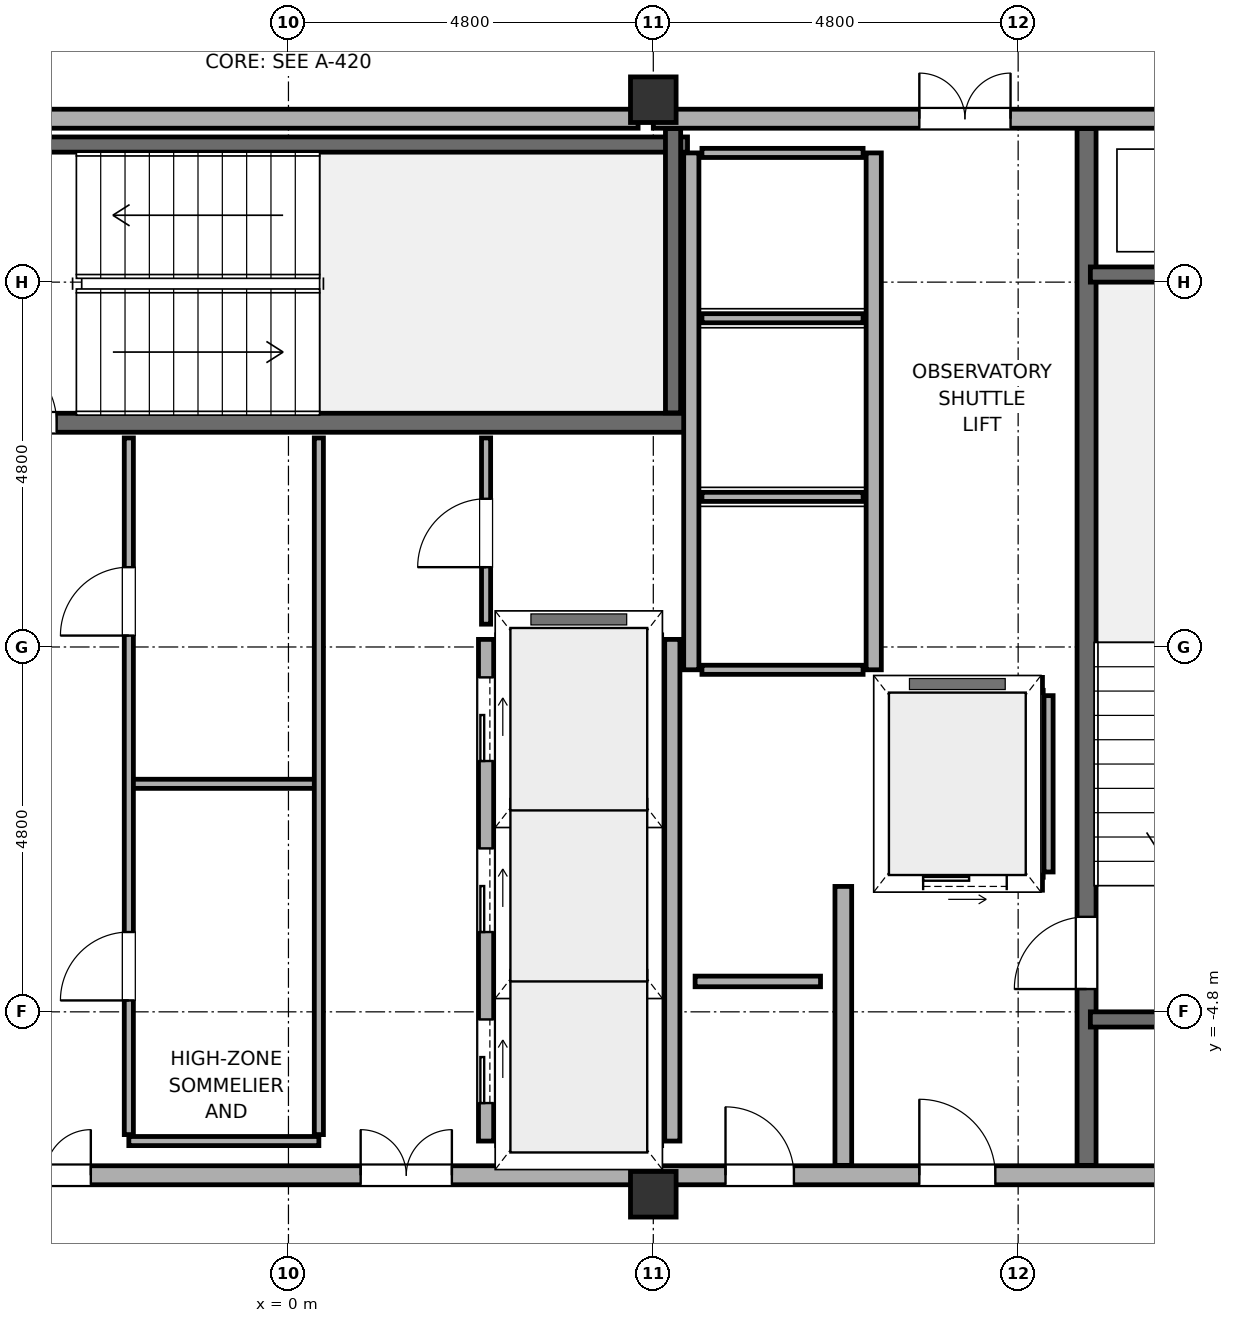
"""IFC4 building model, lengths in metres.
Left out: names, types, materials, properties, quantities, classifications, styles, units other than length and angle.
Written with IfcOpenShell. Run it as: python <this file> out.ifc"""

import sys

from ifc_helpers import new_model, si_unit, direction, frame, frame_2d, origin, origin_2d, place, context, subcontext, project, spatial, rectangle, hollow_rectangle, extrude, element, fill, save


model = new_model("IFC4")
c1 = context("Model", 3, precision=1e-05, world=origin(), true_north=direction((0.0, 1.0)))
c2 = subcontext(c1, "Body", "Model", "MODEL_VIEW")
j1 = project(units=[si_unit("LENGTHUNIT", "METRE"), si_unit("PLANEANGLEUNIT", "RADIAN")], contexts=[c1])
p1 = place(None, origin())
s1 = spatial("IfcSite", under=j1, at=p1, CompositionType="ELEMENT")
p2 = place(p1, origin())
s2 = spatial("IfcBuilding", under=s1, at=p2, CompositionType="ELEMENT")
p3 = place(p2, frame((0.0, 0.0, 222.3)))
s3 = spatial("IfcBuildingStorey", under=s2, at=p3, CompositionType="ELEMENT", Elevation=222.3)
for number, where, z_axis, x_axis in (
    (1, (4.8, -7.2, 0.0), (0.0, 0.0, 1.0), (1.0, 0.0, 0.0)),
    (2, (4.8, 7.2, 0.0), (0.0, 0.0, 1.0), (1.0, 0.0, 0.0)),
):
    element("IfcColumn", number, at=place(p3, frame(where, z_axis=z_axis, x_axis=x_axis)), inside=s3, PredefinedType="COLUMN", context=c2, shape_type="SweptSolid", body=[
        extrude(hollow_rectangle(XDim=0.6, YDim=0.6, WallThickness=0.028, at=origin_2d()), origin(), (0.0, 0.0, 1.0), 3.85),
    ])
p4 = place(p3, frame((-4.6, -6.95, 0.0), z_axis=(0.0, 0.0, 1.0), x_axis=(1.0, 0.0, 0.0)))
e3 = element("IfcWall", 3, at=p4, inside=s3, PredefinedType="SOLIDWALL", context=c2, shape_type="SweptSolid", body=[
    extrude(rectangle(XDim=9.2, YDim=0.25, at=frame_2d((4.6, 0.0))), origin(), (0.0, 0.0, 1.0), 2.47),
])
p5 = place(p4, frame((0.8, 0.0, 0.0)))
e4 = element("IfcOpeningElement", 4, at=p5, cuts=e3, PredefinedType="OPENING", context=c2, shape_type="SweptSolid", body=[
    extrude(rectangle(XDim=1.2, YDim=2.2, at=frame_2d((0.6, 1.1))), frame((0.0, 0.14, 0.0), z_axis=(0.0, -1.0, 0.0), x_axis=(1.0, 0.0, 0.0)), (0.0, 0.0, 1.0), 0.28),
])
p6 = place(p4, frame((5.55, 0.0, 0.0)))
e5 = element("IfcOpeningElement", 5, at=p6, cuts=e3, PredefinedType="OPENING", context=c2, shape_type="SweptSolid", body=[
    extrude(rectangle(XDim=1.2, YDim=2.2, at=frame_2d((0.6, 1.1))), frame((0.0, 0.14, 0.0), z_axis=(0.0, -1.0, 0.0), x_axis=(1.0, 0.0, 0.0)), (0.0, 0.0, 1.0), 0.28),
])
p7 = place(p3, frame((4.8, -6.95, 0.0), z_axis=(0.0, 0.0, 1.0), x_axis=(1.0, 0.0, 0.0)))
e6 = element("IfcWall", 6, at=p7, inside=s3, PredefinedType="SOLIDWALL", context=c2, shape_type="SweptSolid", body=[
    extrude(rectangle(XDim=9.4, YDim=0.25, at=frame_2d((4.7, 0.0))), origin(), (0.0, 0.0, 1.0), 2.27),
])
p8 = place(p7, frame((3.5, 0.0, 0.0)))
e7 = element("IfcOpeningElement", 7, at=p8, cuts=e6, PredefinedType="OPENING", context=c2, shape_type="SweptSolid", body=[
    extrude(rectangle(XDim=1.0, YDim=2.15, at=frame_2d((0.5, 1.075))), frame((0.0, 0.14, 0.0), z_axis=(0.0, -1.0, 0.0), x_axis=(1.0, 0.0, 0.0)), (0.0, 0.0, 1.0), 0.28),
])
p9 = place(p7, frame((0.95, 0.0, 0.0)))
e8 = element("IfcOpeningElement", 8, at=p9, cuts=e6, PredefinedType="OPENING", context=c2, shape_type="SweptSolid", body=[
    extrude(rectangle(XDim=0.9, YDim=2.1, at=frame_2d((0.45, 1.05))), frame((0.0, 0.14, 0.0), z_axis=(0.0, -1.0, 0.0), x_axis=(1.0, 0.0, 0.0)), (0.0, 0.0, 1.0), 0.28),
])
p10 = place(p3, frame((-4.6, 6.95, 0.0), z_axis=(0.0, 0.0, 1.0), x_axis=(1.0, 0.0, 0.0)))
e9 = element("IfcWall", 9, at=p10, inside=s3, PredefinedType="SOLIDWALL", context=c2, shape_type="SweptSolid", body=[
    extrude(rectangle(XDim=9.2, YDim=0.25, at=frame_2d((4.6, 0.0))), origin(), (0.0, 0.0, 1.0), 2.27),
])
p11 = place(p3, frame((4.8, 6.95, 0.0), z_axis=(0.0, 0.0, 1.0), x_axis=(1.0, 0.0, 0.0)))
e10 = element("IfcWall", 10, at=p11, inside=s3, PredefinedType="SOLIDWALL", context=c2, shape_type="SweptSolid", body=[
    extrude(rectangle(XDim=9.4, YDim=0.25, at=frame_2d((4.7, 0.0))), origin(), (0.0, 0.0, 1.0), 2.27),
])
p12 = place(p11, frame((3.5, 0.0, 0.0)))
e11 = element("IfcOpeningElement", 11, at=p12, cuts=e10, PredefinedType="OPENING", context=c2, shape_type="SweptSolid", body=[
    extrude(rectangle(XDim=1.2, YDim=2.2, at=frame_2d((0.6, 1.1))), frame((0.0, 0.14, 0.0), z_axis=(0.0, -1.0, 0.0), x_axis=(1.0, 0.0, 0.0)), (0.0, 0.0, 1.0), 0.28),
])
p13 = place(p3, frame((7.3, -6.82, 0.0), z_axis=(0.0, 0.0, 1.0), x_axis=(0.0, 1.0, 0.0)))
e12 = element("IfcWall", 12, at=p13, inside=s3, PredefinedType="SOLIDWALL", context=c2, shape_type="SweptSolid", body=[
    extrude(rectangle(XDim=3.67, YDim=0.22, at=frame_2d((1.835, 0.0))), origin(), (0.0, 0.0, 1.0), 2.27),
])
p14 = place(p3, frame((10.5, -6.82, -0.18), z_axis=(0.0, 0.0, 1.0), x_axis=(0.0, 1.0, 0.0)))
e13 = element("IfcWall", 13, at=p14, inside=s3, PredefinedType="SOLIDWALL", context=c2, shape_type="SweptSolid", body=[
    extrude(rectangle(XDim=13.64, YDim=0.25, at=frame_2d((6.82, 0.0))), origin(), (0.0, 0.0, 1.0), 3.85),
])
p15 = place(p14, frame((2.32, 0.0, 0.18)))
e14 = element("IfcOpeningElement", 14, at=p15, cuts=e13, PredefinedType="OPENING", context=c2, shape_type="SweptSolid", body=[
    extrude(rectangle(XDim=0.95, YDim=2.15, at=frame_2d((0.475, 1.075))), frame((0.0, 0.14, 0.0), z_axis=(0.0, -1.0, 0.0), x_axis=(1.0, 0.0, 0.0)), (0.0, 0.0, 1.0), 0.28),
])
for number, where, z_axis, x_axis in (
    (15, (10.55, -4.9, -0.18), (0.0, 0.0, 1.0), (1.0, 0.0, 0.0)),
    (16, (10.55, 4.9, -0.18), (0.0, 0.0, 1.0), (1.0, 0.0, 0.0)),
):
    element("IfcWall", number, at=place(p3, frame(where, z_axis=z_axis, x_axis=x_axis)), inside=s3, PredefinedType="SOLIDWALL", context=c2, shape_type="SweptSolid", body=[
        extrude(rectangle(XDim=3.65, YDim=0.2, at=frame_2d((1.825, 0.0))), origin(), (0.0, 0.0, 1.0), 3.85),
    ])
p16 = place(p3, frame((-4.65, 2.95, -0.18), z_axis=(0.0, 0.0, 1.0), x_axis=(1.0, 0.0, 0.0)))
e17 = element("IfcWall", 17, at=p16, inside=s3, PredefinedType="SOLIDWALL", context=c2, shape_type="SweptSolid", body=[
    extrude(rectangle(XDim=9.9, YDim=0.25, at=frame_2d((4.95, 0.0))), origin(), (0.0, 0.0, 1.0), 3.85),
])
p17 = place(p16, frame((0.65, 0.0, 0.18)))
e18 = element("IfcOpeningElement", 18, at=p17, cuts=e17, PredefinedType="OPENING", context=c2, shape_type="SweptSolid", body=[
    extrude(rectangle(XDim=0.95, YDim=2.15, at=frame_2d((0.475, 1.075))), frame((0.0, 0.14, 0.0), z_axis=(0.0, -1.0, 0.0), x_axis=(1.0, 0.0, 0.0)), (0.0, 0.0, 1.0), 0.28),
])
p18 = place(p3, frame((-4.65, 6.61, -0.18), z_axis=(0.0, 0.0, 1.0), x_axis=(1.0, 0.0, 0.0)))
e19 = element("IfcWall", 19, at=p18, inside=s3, PredefinedType="SOLIDWALL", context=c2, shape_type="SweptSolid", body=[
    extrude(rectangle(XDim=9.9, YDim=0.2, at=frame_2d((4.95, 0.0))), origin(), (0.0, 0.0, 1.0), 3.85),
])
p19 = place(p3, frame((5.06, 3.08, -0.18), z_axis=(0.0, 0.0, 1.0), x_axis=(0.0, 1.0, 0.0)))
e20 = element("IfcWall", 20, at=p19, inside=s3, PredefinedType="SOLIDWALL", context=c2, shape_type="SweptSolid", body=[
    extrude(rectangle(XDim=3.74, YDim=0.2, at=frame_2d((1.87, 0.0))), origin(), (0.0, 0.0, 1.0), 3.85),
])
p20 = place(p3, frame((2.6, -6.5, 0.0), z_axis=(0.0, 0.0, 1.0), x_axis=(0.0, 1.0, 0.0)))
e21 = element("IfcWall", 21, at=p20, inside=s3, PredefinedType="SOLIDWALL", context=c2, shape_type="SweptSolid", body=[
    extrude(rectangle(XDim=6.6, YDim=0.2, at=frame_2d((3.3, 0.0))), origin(), (0.0, 0.0, 1.0), 3.67),
])
p21 = place(p20, frame((0.5, 0.0, 0.0)))
e22 = element("IfcOpeningElement", 22, at=p21, cuts=e21, PredefinedType="OPENING", context=c2, shape_type="SweptSolid", body=[
    extrude(rectangle(XDim=1.1, YDim=2.2, at=frame_2d((0.55, 1.1))), frame((0.0, 0.115, 0.0), z_axis=(0.0, -1.0, 0.0), x_axis=(1.0, 0.0, 0.0)), (0.0, 0.0, 1.0), 0.23),
])
p22 = place(p20, frame((2.75, 0.0, 0.0)))
e23 = element("IfcOpeningElement", 23, at=p22, cuts=e21, PredefinedType="OPENING", context=c2, shape_type="SweptSolid", body=[
    extrude(rectangle(XDim=1.1, YDim=2.2, at=frame_2d((0.55, 1.1))), frame((0.0, 0.115, 0.0), z_axis=(0.0, -1.0, 0.0), x_axis=(1.0, 0.0, 0.0)), (0.0, 0.0, 1.0), 0.23),
])
p23 = place(p20, frame((5.0, 0.0, 0.0)))
e24 = element("IfcOpeningElement", 24, at=p23, cuts=e21, PredefinedType="OPENING", context=c2, shape_type="SweptSolid", body=[
    extrude(rectangle(XDim=1.1, YDim=2.2, at=frame_2d((0.55, 1.1))), frame((0.0, 0.115, 0.0), z_axis=(0.0, -1.0, 0.0), x_axis=(1.0, 0.0, 0.0)), (0.0, 0.0, 1.0), 0.23),
])
p24 = place(p3, frame((5.05, -6.5, 0.0), z_axis=(0.0, 0.0, 1.0), x_axis=(0.0, 1.0, 0.0)))
e25 = element("IfcWall", 25, at=p24, inside=s3, PredefinedType="SOLIDWALL", context=c2, shape_type="SweptSolid", body=[
    extrude(rectangle(XDim=6.6, YDim=0.2, at=frame_2d((3.3, 0.0))), origin(), (0.0, 0.0, 1.0), 3.67),
])
for number, where, z_axis, x_axis in (
    (26, (2.74, -6.5, 0.0), (0.0, 0.0, 1.0), (1.0, 0.0, 0.0)),
    (27, (2.74, -4.325, 0.0), (0.0, 0.0, 1.0), (1.0, 0.0, 0.0)),
    (28, (2.74, -2.075, 0.0), (0.0, 0.0, 1.0), (1.0, 0.0, 0.0)),
    (29, (2.74, 0.1, 0.0), (0.0, 0.0, 1.0), (1.0, 0.0, 0.0)),
):
    element("IfcWall", number, at=place(p3, frame(where, z_axis=z_axis, x_axis=x_axis)), inside=s3, PredefinedType="PARTITIONING", context=c2, shape_type="SweptSolid", body=[
        extrude(rectangle(XDim=2.17, YDim=0.12, at=frame_2d((1.085, 0.0))), origin(), (0.0, 0.0, 1.0), 3.67),
    ])
for number, where, z_axis, x_axis in (
    (30, (7.7, -0.3, 0.0), (0.0, 0.0, 1.0), (0.0, 1.0, 0.0)),
    (31, (5.3, -0.3, 0.0), (0.0, 0.0, 1.0), (0.0, 1.0, 0.0)),
):
    element("IfcWall", number, at=place(p3, frame(where, z_axis=z_axis, x_axis=x_axis)), inside=s3, PredefinedType="SOLIDWALL", context=c2, shape_type="SweptSolid", body=[
        extrude(rectangle(XDim=6.8, YDim=0.2, at=frame_2d((3.4, 0.0))), origin(), (0.0, 0.0, 1.0), 3.67),
    ])
for number, where, z_axis, x_axis in (
    (32, (5.44, -0.3, 0.0), (0.0, 0.0, 1.0), (1.0, 0.0, 0.0)),
    (33, (5.44, 1.975, 0.0), (0.0, 0.0, 1.0), (1.0, 0.0, 0.0)),
    (34, (5.44, 4.325, 0.0), (0.0, 0.0, 1.0), (1.0, 0.0, 0.0)),
    (35, (5.44, 6.5, 0.0), (0.0, 0.0, 1.0), (1.0, 0.0, 0.0)),
):
    element("IfcWall", number, at=place(p3, frame(where, z_axis=z_axis, x_axis=x_axis)), inside=s3, PredefinedType="PARTITIONING", context=c2, shape_type="SweptSolid", body=[
        extrude(rectangle(XDim=2.12, YDim=0.12, at=frame_2d((1.06, 0.0))), origin(), (0.0, 0.0, 1.0), 3.67),
    ])
p25 = place(p3, frame((7.88, -3.1, 0.0), z_axis=(0.0, 0.0, 1.0), x_axis=(1.0, 0.0, 0.0)))
e36 = element("IfcWall", 36, at=p25, inside=s3, PredefinedType="SOLIDWALL", context=c2, shape_type="SweptSolid", body=[
    extrude(rectangle(XDim=2.04, YDim=0.2, at=frame_2d((1.02, 0.0))), origin(), (0.0, 0.0, 1.0), 3.67),
])
p26 = place(p25, frame((0.47, 0.0, 0.0)))
e37 = element("IfcOpeningElement", 37, at=p26, cuts=e36, PredefinedType="OPENING", context=c2, shape_type="SweptSolid", body=[
    extrude(rectangle(XDim=1.1, YDim=2.2, at=frame_2d((0.55, 1.1))), frame((0.0, 0.115, 0.0), z_axis=(0.0, -1.0, 0.0), x_axis=(1.0, 0.0, 0.0)), (0.0, 0.0, 1.0), 0.23),
])
p27 = place(p3, frame((7.88, -0.5, 0.0), z_axis=(0.0, 0.0, 1.0), x_axis=(1.0, 0.0, 0.0)))
e38 = element("IfcWall", 38, at=p27, inside=s3, PredefinedType="SOLIDWALL", context=c2, shape_type="SweptSolid", body=[
    extrude(rectangle(XDim=2.04, YDim=0.2, at=frame_2d((1.02, 0.0))), origin(), (0.0, 0.0, 1.0), 3.67),
])
for number, where, z_axis, x_axis in (
    (39, (7.8, -2.96, 0.0), (0.0, 0.0, 1.0), (0.0, 1.0, 0.0)),
    (40, (10.0, -2.96, 0.0), (0.0, 0.0, 1.0), (0.0, 1.0, 0.0)),
):
    element("IfcWall", number, at=place(p3, frame(where, z_axis=z_axis, x_axis=x_axis)), inside=s3, PredefinedType="PARTITIONING", context=c2, shape_type="SweptSolid", body=[
        extrude(rectangle(XDim=2.32, YDim=0.12, at=frame_2d((1.16, 0.0))), origin(), (0.0, 0.0, 1.0), 3.67),
    ])
p28 = place(p3, frame((-2.1, -6.5, 0.0), z_axis=(0.0, 0.0, 1.0), x_axis=(1.0, 0.0, 0.0)))
e41 = element("IfcWall", 41, at=p28, inside=s3, PredefinedType="PARTITIONING", context=c2, shape_type="SweptSolid", body=[
    extrude(rectangle(XDim=2.5, YDim=0.12, at=frame_2d((1.25, 0.0))), origin(), (0.0, 0.0, 1.0), 3.67),
])
p29 = place(p3, frame((5.35, -4.4, 0.0), z_axis=(0.0, 0.0, 1.0), x_axis=(1.0, 0.0, 0.0)))
e42 = element("IfcWall", 42, at=p29, inside=s3, PredefinedType="PLUMBINGWALL", context=c2, shape_type="SweptSolid", body=[
    extrude(rectangle(XDim=1.65, YDim=0.14, at=frame_2d((0.825, 0.0))), origin(), (0.0, 0.0, 1.0), 3.67),
])
p30 = place(p3, frame((-2.1, -1.8, 0.0), z_axis=(0.0, 0.0, 1.0), x_axis=(1.0, 0.0, 0.0)))
e43 = element("IfcWall", 43, at=p30, inside=s3, PredefinedType="PARTITIONING", context=c2, shape_type="SweptSolid", body=[
    extrude(rectangle(XDim=2.5, YDim=0.12, at=frame_2d((1.25, 0.0))), origin(), (0.0, 0.0, 1.0), 3.67),
])
p31 = place(p3, frame((-2.1, -6.415, 0.0), z_axis=(0.0, 0.0, 1.0), x_axis=(0.0, 1.0, 0.0)))
e44 = element("IfcWall", 44, at=p31, inside=s3, PredefinedType="PARTITIONING", context=c2, shape_type="SweptSolid", body=[
    extrude(rectangle(XDim=9.165, YDim=0.12, at=frame_2d((4.583, 0.0))), origin(), (0.0, 0.0, 1.0), 3.67),
])
p32 = place(p31, frame((1.765, 0.0, 0.0)))
e45 = element("IfcOpeningElement", 45, at=p32, cuts=e44, PredefinedType="OPENING", context=c2, shape_type="SweptSolid", body=[
    extrude(rectangle(XDim=0.9, YDim=2.1, at=frame_2d((0.45, 1.05))), frame((0.0, 0.075, 0.0), z_axis=(0.0, -1.0, 0.0), x_axis=(1.0, 0.0, 0.0)), (0.0, 0.0, 1.0), 0.15),
])
p33 = place(p31, frame((6.565, 0.0, 0.0)))
e46 = element("IfcOpeningElement", 46, at=p33, cuts=e44, PredefinedType="OPENING", context=c2, shape_type="SweptSolid", body=[
    extrude(rectangle(XDim=0.9, YDim=2.1, at=frame_2d((0.45, 1.05))), frame((0.0, 0.075, 0.0), z_axis=(0.0, -1.0, 0.0), x_axis=(1.0, 0.0, 0.0)), (0.0, 0.0, 1.0), 0.15),
])
p34 = place(p3, frame((0.4, -6.415, 0.0), z_axis=(0.0, 0.0, 1.0), x_axis=(0.0, 1.0, 0.0)))
e47 = element("IfcWall", 47, at=p34, inside=s3, PredefinedType="PARTITIONING", context=c2, shape_type="SweptSolid", body=[
    extrude(rectangle(XDim=9.165, YDim=0.12, at=frame_2d((4.583, 0.0))), origin(), (0.0, 0.0, 1.0), 3.67),
])
p35 = place(p3, frame((2.6, 0.3, 0.0), z_axis=(0.0, 0.0, 1.0), x_axis=(0.0, 1.0, 0.0)))
e48 = element("IfcWall", 48, at=p35, inside=s3, PredefinedType="PARTITIONING", context=c2, shape_type="SweptSolid", body=[
    extrude(rectangle(XDim=2.45, YDim=0.12, at=frame_2d((1.225, 0.0))), origin(), (0.0, 0.0, 1.0), 3.67),
])
p36 = place(p35, frame((0.75, 0.0, 0.0)))
e49 = element("IfcOpeningElement", 49, at=p36, cuts=e48, PredefinedType="OPENING", context=c2, shape_type="SweptSolid", body=[
    extrude(rectangle(XDim=0.9, YDim=2.1, at=frame_2d((0.45, 1.05))), frame((0.0, 0.075, 0.0), z_axis=(0.0, -1.0, 0.0), x_axis=(1.0, 0.0, 0.0)), (0.0, 0.0, 1.0), 0.15),
])
p37 = place(p8, origin())
e50 = element("IfcDoor", 50, at=p37, inside=s3, OperationType="SINGLE_SWING_RIGHT", PredefinedType="DOOR", context=c2, shape_type="SweptSolid", body=[
    extrude(rectangle(XDim=1.0, YDim=2.15, at=frame_2d((0.5, 1.075))), frame((0.0, 0.025, 0.0), z_axis=(0.0, -1.0, 0.0), x_axis=(1.0, 0.0, 0.0)), (0.0, 0.0, 1.0), 0.05),
])
fill(e7, e50)
p38 = place(p5, origin())
e51 = element("IfcDoor", 51, at=p38, inside=s3, OperationType="DOUBLE_DOOR_SINGLE_SWING", PredefinedType="DOOR", context=c2, shape_type="SweptSolid", body=[
    extrude(rectangle(XDim=1.2, YDim=2.2, at=frame_2d((0.6, 1.1))), frame((0.0, 0.025, 0.0), z_axis=(0.0, -1.0, 0.0), x_axis=(1.0, 0.0, 0.0)), (0.0, 0.0, 1.0), 0.05),
])
fill(e4, e51)
p39 = place(p6, origin())
e52 = element("IfcDoor", 52, at=p39, inside=s3, OperationType="DOUBLE_DOOR_SINGLE_SWING", PredefinedType="DOOR", context=c2, shape_type="SweptSolid", body=[
    extrude(rectangle(XDim=1.2, YDim=2.2, at=frame_2d((0.6, 1.1))), frame((0.0, 0.025, 0.0), z_axis=(0.0, -1.0, 0.0), x_axis=(1.0, 0.0, 0.0)), (0.0, 0.0, 1.0), 0.05),
])
fill(e5, e52)
p40 = place(p12, origin())
e53 = element("IfcDoor", 53, at=p40, inside=s3, OperationType="DOUBLE_DOOR_SINGLE_SWING", PredefinedType="DOOR", context=c2, shape_type="SweptSolid", body=[
    extrude(rectangle(XDim=1.2, YDim=2.2, at=frame_2d((0.6, 1.1))), frame((0.0, 0.025, 0.0), z_axis=(0.0, -1.0, 0.0), x_axis=(1.0, 0.0, 0.0)), (0.0, 0.0, 1.0), 0.05),
])
fill(e11, e53)
p41 = place(p15, origin())
e54 = element("IfcDoor", 54, at=p41, inside=s3, OperationType="SINGLE_SWING_LEFT", PredefinedType="DOOR", context=c2, shape_type="SweptSolid", body=[
    extrude(rectangle(XDim=0.95, YDim=2.15, at=frame_2d((0.475, 1.075))), frame((0.0, 0.025, 0.0), z_axis=(0.0, -1.0, 0.0), x_axis=(1.0, 0.0, 0.0)), (0.0, 0.0, 1.0), 0.05),
])
fill(e14, e54)
p42 = place(p17, origin())
e55 = element("IfcDoor", 55, at=p42, inside=s3, OperationType="SINGLE_SWING_LEFT", PredefinedType="DOOR", context=c2, shape_type="SweptSolid", body=[
    extrude(rectangle(XDim=0.95, YDim=2.15, at=frame_2d((0.475, 1.075))), frame((0.0, 0.025, 0.0), z_axis=(0.0, -1.0, 0.0), x_axis=(1.0, 0.0, 0.0)), (0.0, 0.0, 1.0), 0.05),
])
fill(e18, e55)
p43 = place(p21, origin())
e56 = element("IfcDoor", 56, at=p43, inside=s3, OperationType="SLIDING_TO_LEFT", PredefinedType="DOOR", context=c2, shape_type="SweptSolid", body=[
    extrude(rectangle(XDim=1.1, YDim=2.2, at=frame_2d((0.55, 1.1))), frame((0.0, 0.025, 0.0), z_axis=(0.0, -1.0, 0.0), x_axis=(1.0, 0.0, 0.0)), (0.0, 0.0, 1.0), 0.05),
])
fill(e22, e56)
p44 = place(p22, origin())
e57 = element("IfcDoor", 57, at=p44, inside=s3, OperationType="SLIDING_TO_LEFT", PredefinedType="DOOR", context=c2, shape_type="SweptSolid", body=[
    extrude(rectangle(XDim=1.1, YDim=2.2, at=frame_2d((0.55, 1.1))), frame((0.0, 0.025, 0.0), z_axis=(0.0, -1.0, 0.0), x_axis=(1.0, 0.0, 0.0)), (0.0, 0.0, 1.0), 0.05),
])
fill(e23, e57)
p45 = place(p23, origin())
e58 = element("IfcDoor", 58, at=p45, inside=s3, OperationType="SLIDING_TO_LEFT", PredefinedType="DOOR", context=c2, shape_type="SweptSolid", body=[
    extrude(rectangle(XDim=1.1, YDim=2.2, at=frame_2d((0.55, 1.1))), frame((0.0, 0.025, 0.0), z_axis=(0.0, -1.0, 0.0), x_axis=(1.0, 0.0, 0.0)), (0.0, 0.0, 1.0), 0.05),
])
fill(e24, e58)
p46 = place(p26, origin())
e59 = element("IfcDoor", 59, at=p46, inside=s3, OperationType="SLIDING_TO_LEFT", PredefinedType="DOOR", context=c2, shape_type="SweptSolid", body=[
    extrude(rectangle(XDim=1.1, YDim=2.2, at=frame_2d((0.55, 1.1))), frame((0.0, 0.025, 0.0), z_axis=(0.0, -1.0, 0.0), x_axis=(1.0, 0.0, 0.0)), (0.0, 0.0, 1.0), 0.05),
])
fill(e37, e59)
p47 = place(p32, origin())
e60 = element("IfcDoor", 60, at=p47, inside=s3, OperationType="SINGLE_SWING_RIGHT", PredefinedType="DOOR", context=c2, shape_type="SweptSolid", body=[
    extrude(rectangle(XDim=0.9, YDim=2.1, at=frame_2d((0.45, 1.05))), frame((0.0, 0.025, 0.0), z_axis=(0.0, -1.0, 0.0), x_axis=(1.0, 0.0, 0.0)), (0.0, 0.0, 1.0), 0.05),
])
fill(e45, e60)
p48 = place(p33, origin())
e61 = element("IfcDoor", 61, at=p48, inside=s3, OperationType="SINGLE_SWING_RIGHT", PredefinedType="DOOR", context=c2, shape_type="SweptSolid", body=[
    extrude(rectangle(XDim=0.9, YDim=2.1, at=frame_2d((0.45, 1.05))), frame((0.0, 0.025, 0.0), z_axis=(0.0, -1.0, 0.0), x_axis=(1.0, 0.0, 0.0)), (0.0, 0.0, 1.0), 0.05),
])
fill(e46, e61)
p49 = place(p36, origin())
e62 = element("IfcDoor", 62, at=p49, inside=s3, OperationType="SINGLE_SWING_LEFT", PredefinedType="DOOR", context=c2, shape_type="SweptSolid", body=[
    extrude(rectangle(XDim=0.9, YDim=2.1, at=frame_2d((0.45, 1.05))), frame((0.0, 0.025, 0.0), z_axis=(0.0, -1.0, 0.0), x_axis=(1.0, 0.0, 0.0)), (0.0, 0.0, 1.0), 0.05),
])
fill(e49, e62)
p50 = place(p9, origin())
e63 = element("IfcDoor", 63, at=p50, inside=s3, OperationType="SINGLE_SWING_LEFT", PredefinedType="DOOR", context=c2, shape_type="SweptSolid", body=[
    extrude(rectangle(XDim=0.9, YDim=2.1, at=frame_2d((0.45, 1.05))), frame((0.0, 0.025, 0.0), z_axis=(0.0, -1.0, 0.0), x_axis=(1.0, 0.0, 0.0)), (0.0, 0.0, 1.0), 0.05),
])
fill(e8, e63)
save(model, sys.argv[1])
